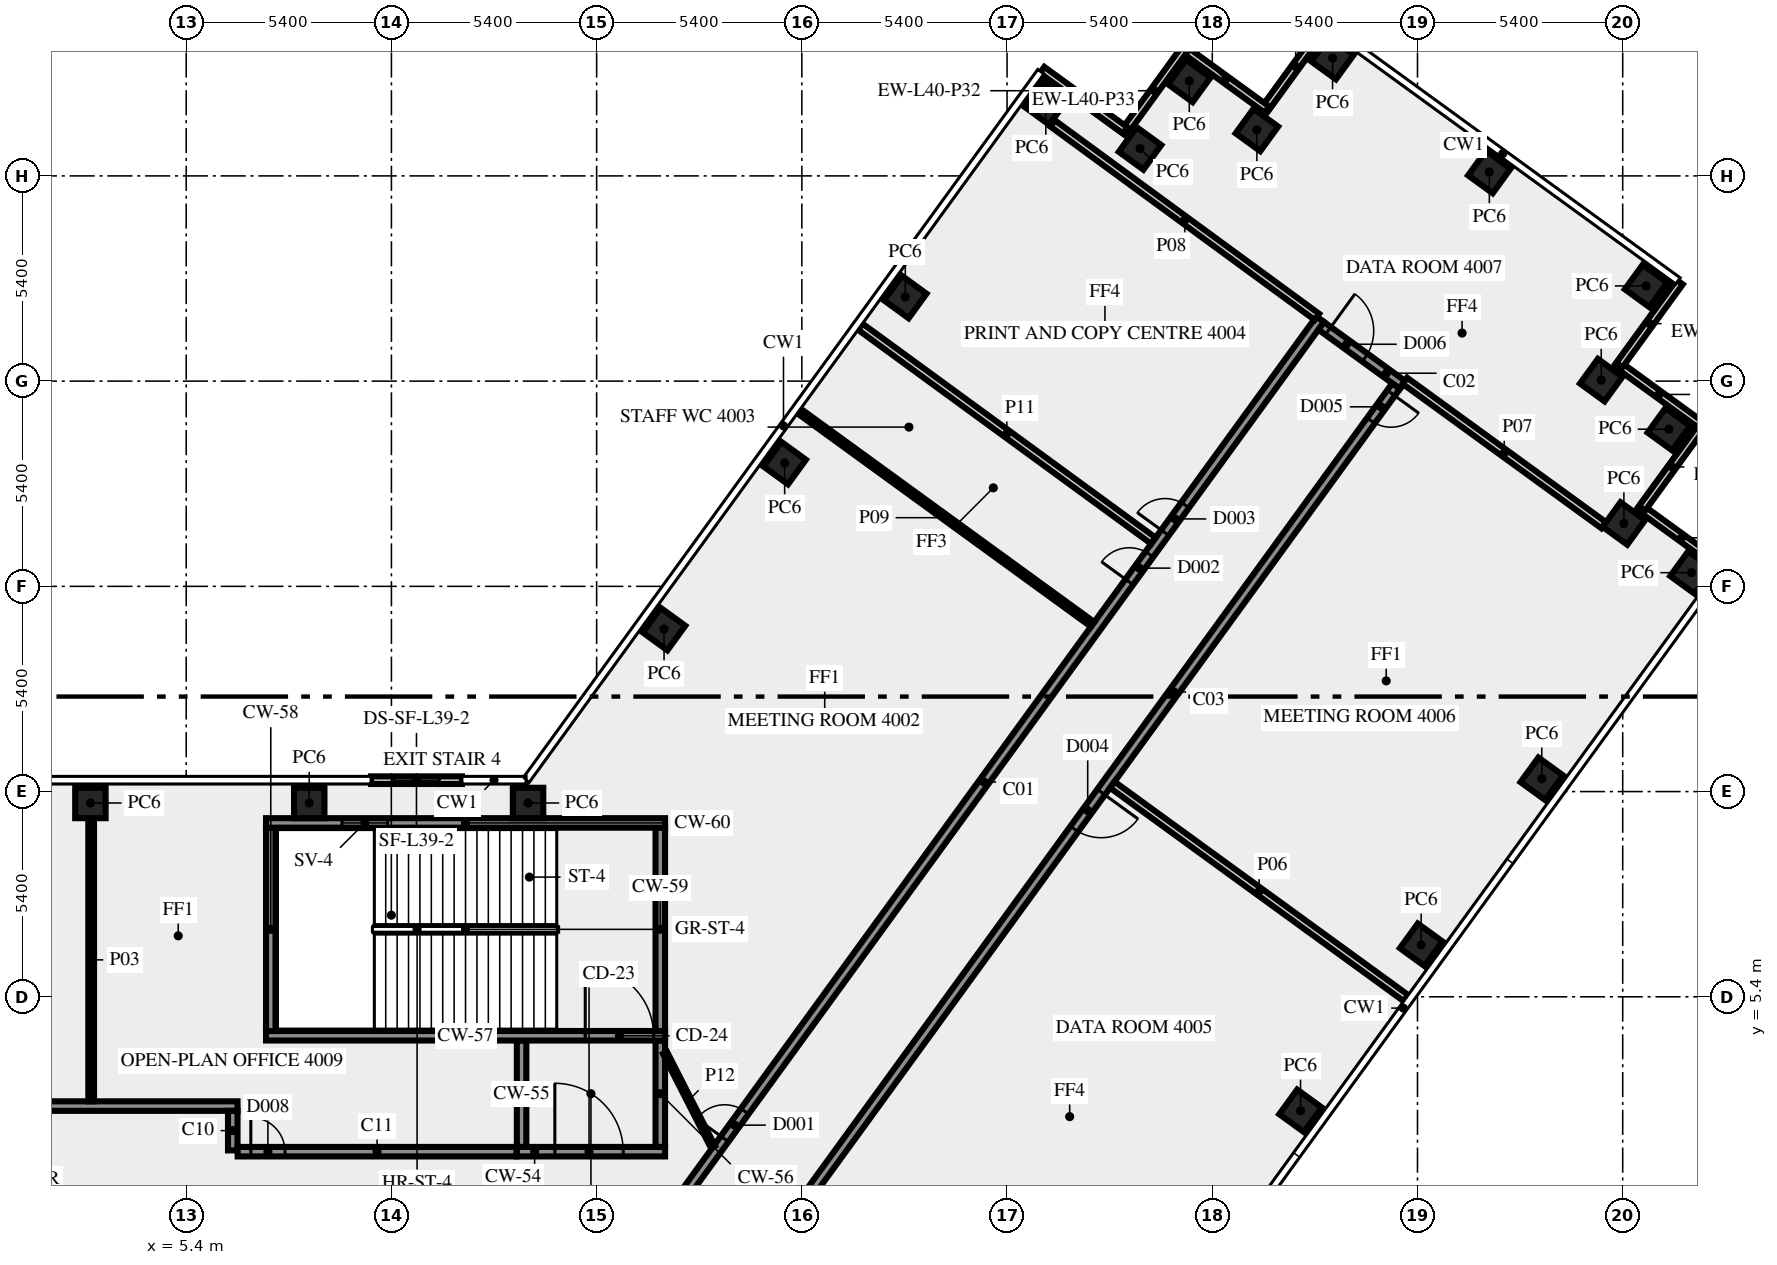
"""IFC4 building model, lengths in metres.
Left out: names, types, materials, properties, quantities, classifications, styles, units other than length and angle.
Written with IfcOpenShell. Run it as: python <this file> out.ifc"""

import sys

from ifc_helpers import new_model, si_unit, direction, frame, frame_2d, origin, origin_2d, place, context, subcontext, project, spatial, rectangle, extrude, element, fill, save


model = new_model("IFC4")
c1 = context("Model", 3, precision=1e-05, world=origin(), true_north=direction((0.0, 1.0)))
c2 = subcontext(c1, "Body", "Model", "MODEL_VIEW")
j1 = project(units=[si_unit("LENGTHUNIT", "METRE"), si_unit("PLANEANGLEUNIT", "RADIAN")], contexts=[c1])
p1 = place(None, origin())
s1 = spatial("IfcSite", under=j1, at=p1, CompositionType="ELEMENT")
p2 = place(p1, origin())
s2 = spatial("IfcBuilding", under=s1, at=p2, CompositionType="ELEMENT")
p3 = place(p2, frame((0.0, 0.0, 172.0)))
s3 = spatial("IfcBuildingStorey", under=s2, at=p3, CompositionType="ELEMENT", Elevation=172.0)
for number, where, z_axis, x_axis in (
    (1, (34.722, 2.4, 0.0), (0.0, 0.0, 1.0), (0.588, 0.809, 0.0)),
    (2, (37.896, 6.769, 0.0), (0.0, 0.0, 1.0), (0.588, 0.809, 0.0)),
    (3, (41.07, 11.137, 0.0), (0.0, 0.0, 1.0), (0.588, 0.809, 0.0)),
    (4, (45.01, 16.56, 0.0), (0.0, 0.0, 1.0), (0.588, 0.809, 0.0)),
    (5, (43.231, 17.854, 0.0), (0.0, 0.0, 1.0), (0.588, 0.809, 0.0)),
    (6, (44.415, 20.335, 0.0), (0.0, 0.0, 1.0), (0.588, 0.809, 0.0)),
    (7, (42.635, 21.626, 0.0), (0.0, 0.0, 1.0), (-0.809, 0.588, 0.0)),
    (8, (43.815, 24.105, 0.0), (0.0, 0.0, 1.0), (-0.809, 0.588, 0.0)),
    (9, (39.691, 27.102, 0.0), (0.0, 0.0, 1.0), (-0.809, 0.588, 0.0)),
    (10, (35.565, 30.1, 0.0), (0.0, 0.0, 1.0), (-0.588, -0.809, 0.0)),
    (11, (33.574, 28.209, 0.0), (0.0, 0.0, 1.0), (-0.809, 0.588, 0.0)),
    (12, (31.795, 29.5, 0.0), (0.0, 0.0, 1.0), (-0.588, -0.809, 0.0)),
    (13, (30.499, 27.723, 0.0), (0.0, 0.0, 1.0), (-0.809, 0.588, 0.0)),
    (14, (28.02, 28.905, 0.0), (0.0, 0.0, 1.0), (-0.809, 0.588, 0.0)),
    (15, (24.321, 23.812, 0.0), (0.0, 0.0, 1.0), (-0.588, -0.809, 0.0)),
    (16, (21.147, 19.444, 0.0), (0.0, 0.0, 1.0), (-0.588, -0.809, 0.0)),
    (17, (17.974, 15.075, 0.0), (0.0, 0.0, 1.0), (-0.588, -0.809, 0.0)),
    (18, (14.395, 10.5, 0.0), (0.0, 0.0, 1.0), (-1.0, 0.0, 0.0)),
    (19, (8.637, 10.5, 0.0), (0.0, 0.0, 1.0), (-1.0, 0.0, 0.0)),
    (20, (2.879, 10.5, 0.0), (0.0, 0.0, 1.0), (-1.0, 0.0, 0.0)),
):
    element("IfcColumn", number, at=place(p3, frame(where, z_axis=z_axis, x_axis=x_axis)), inside=s3, PredefinedType="COLUMN", context=c2, shape_type="SweptSolid", body=[
        extrude(rectangle(XDim=0.8, YDim=0.8, at=origin_2d()), origin(), (0.0, 0.0, 1.0), 3.65),
    ])
for number, where, z_axis, x_axis in (
    (21, (45.842, 16.685, 0.0), (0.0, 0.0, 1.0), (-0.809, 0.588, 0.0)),
    (22, (43.709, 18.249, 0.0), (0.0, 0.0, 1.0), (0.588, 0.809, 0.0)),
    (23, (45.245, 20.456, 0.0), (0.0, 0.0, 1.0), (-0.809, 0.588, 0.0)),
    (24, (43.113, 22.02, 0.0), (0.0, 0.0, 1.0), (0.588, 0.809, 0.0)),
    (25, (35.388, 30.97, 0.0), (0.0, 0.0, 1.0), (-0.588, -0.809, 0.0)),
    (26, (33.838, 28.744, 0.0), (0.0, 0.0, 1.0), (-0.809, 0.588, 0.0)),
    (27, (31.67, 30.333, 0.0), (0.0, 0.0, 1.0), (-0.588, -0.809, 0.0)),
    (28, (30.106, 28.2, 0.0), (0.0, 0.0, 1.0), (-0.809, 0.588, 0.0)),
):
    element("IfcWall", number, at=place(p3, frame(where, z_axis=z_axis, x_axis=x_axis)), inside=s3, PredefinedType="SOLIDWALL", context=c2, shape_type="SweptSolid", body=[
        extrude(rectangle(XDim=2.7, YDim=0.2, at=frame_2d((1.35, 0.0))), origin(), (0.0, 0.0, 1.0), 3.65),
    ])
p4 = place(p3, frame((12.655, 11.1, 0.0), z_axis=(0.0, 0.0, 1.0), x_axis=(-1.0, 0.0, 0.0)))
e29 = element("IfcWall", 29, at=p4, inside=s3, PredefinedType="SOLIDWALL", context=c2, shape_type="SweptSolid", body=[
    extrude(rectangle(XDim=2.392, YDim=0.2, at=frame_2d((1.196, 0.0))), origin(), (0.0, 0.0, 1.0), 3.65),
])
p5 = place(p4, frame((0.596, 0.0, 1.0)))
e30 = element("IfcOpeningElement", 30, at=p5, cuts=e29, PredefinedType="OPENING", context=c2, shape_type="SweptSolid", body=[
    extrude(rectangle(XDim=1.2, YDim=1.2, at=frame_2d((0.6, 0.6))), frame((0.0, 0.11, 0.0), z_axis=(0.0, -1.0, 0.0), x_axis=(1.0, 0.0, 0.0)), (0.0, 0.0, 1.0), 0.22),
])
p6 = place(p3, frame((14.1, 1.325, 0.0), z_axis=(0.0, 0.0, 1.0), x_axis=(1.0, 0.0, 0.0)))
e31 = element("IfcWall", 31, at=p6, inside=s3, PredefinedType="SHEAR", context=c2, shape_type="SweptSolid", body=[
    extrude(rectangle(XDim=3.9, YDim=0.25, at=frame_2d((1.95, 0.0))), origin(), (0.0, 0.0, 1.0), 3.65),
])
p7 = place(p6, frame((1.0, 0.0, 0.0)))
e32 = element("IfcOpeningElement", 32, at=p7, cuts=e31, PredefinedType="OPENING", context=c2, shape_type="SweptSolid", body=[
    extrude(rectangle(XDim=1.8, YDim=2.1, at=frame_2d((0.9, 1.05))), frame((0.0, 0.135, 0.0), z_axis=(0.0, -1.0, 0.0), x_axis=(1.0, 0.0, 0.0)), (0.0, 0.0, 1.0), 0.27),
])
for number, where, z_axis, x_axis in (
    (33, (14.225, 1.45, 0.0), (0.0, 0.0, 1.0), (0.0, 1.0, 0.0)),
    (34, (17.875, 1.45, 0.0), (0.0, 0.0, 1.0), (0.0, 1.0, 0.0)),
):
    element("IfcWall", number, at=place(p3, frame(where, z_axis=z_axis, x_axis=x_axis)), inside=s3, PredefinedType="SHEAR", context=c2, shape_type="SweptSolid", body=[
        extrude(rectangle(XDim=2.8, YDim=0.25, at=frame_2d((1.4, 0.0))), origin(), (0.0, 0.0, 1.0), 3.65),
    ])
p8 = place(p3, frame((7.5, 4.375, 0.0), z_axis=(0.0, 0.0, 1.0), x_axis=(1.0, 0.0, 0.0)))
e35 = element("IfcWall", 35, at=p8, inside=s3, PredefinedType="SHEAR", context=c2, shape_type="SweptSolid", body=[
    extrude(rectangle(XDim=10.5, YDim=0.25, at=frame_2d((5.25, 0.0))), origin(), (0.0, 0.0, 1.0), 3.65),
])
p9 = place(p8, frame((8.4, 0.0, 0.0)))
e36 = element("IfcOpeningElement", 36, at=p9, cuts=e35, PredefinedType="OPENING", context=c2, shape_type="SweptSolid", body=[
    extrude(rectangle(XDim=1.8, YDim=2.1, at=frame_2d((0.9, 1.05))), frame((0.0, 0.135, 0.0), z_axis=(0.0, -1.0, 0.0), x_axis=(1.0, 0.0, 0.0)), (0.0, 0.0, 1.0), 0.27),
])
for number, where, z_axis, x_axis in (
    (37, (7.625, 4.5, 0.0), (0.0, 0.0, 1.0), (0.0, 1.0, 0.0)),
    (38, (17.875, 4.5, 0.0), (0.0, 0.0, 1.0), (0.0, 1.0, 0.0)),
):
    element("IfcWall", number, at=place(p3, frame(where, z_axis=z_axis, x_axis=x_axis)), inside=s3, PredefinedType="SHEAR", context=c2, shape_type="SweptSolid", body=[
        extrude(rectangle(XDim=5.35, YDim=0.25, at=frame_2d((2.675, 0.0))), origin(), (0.0, 0.0, 1.0), 3.65),
    ])
p10 = place(p3, frame((7.5, 9.975, 0.0), z_axis=(0.0, 0.0, 1.0), x_axis=(1.0, 0.0, 0.0)))
e39 = element("IfcWall", 39, at=p10, inside=s3, PredefinedType="SHEAR", context=c2, shape_type="SweptSolid", body=[
    extrude(rectangle(XDim=10.5, YDim=0.25, at=frame_2d((5.25, 0.0))), origin(), (0.0, 0.0, 1.0), 3.65),
])
p11 = place(p10, frame((2.0, 0.0, 1.0)))
e40 = element("IfcOpeningElement", 40, at=p11, cuts=e39, PredefinedType="OPENING", context=c2, shape_type="SweptSolid", body=[
    extrude(rectangle(XDim=1.2, YDim=1.2, at=frame_2d((0.6, 0.6))), frame((0.0, 0.135, 0.0), z_axis=(0.0, -1.0, 0.0), x_axis=(1.0, 0.0, 0.0)), (0.0, 0.0, 1.0), 0.27),
])
p12 = place(p3, frame((17.545, -1.125, 0.0), z_axis=(0.0, 0.0, 1.0), x_axis=(0.587786330937, 0.809016210693, 0.0)))
e41 = element("IfcWall", 41, at=p12, inside=s3, PredefinedType="SOLIDWALL", context=c2, shape_type="SweptSolid", body=[
    extrude(rectangle(XDim=30.103, YDim=0.25, at=frame_2d((15.052, 0.0))), origin(), (0.0, 0.0, 1.0), 3.65),
])
p13 = place(p12, frame((3.441, 0.0, 0.0)))
e42 = element("IfcOpeningElement", 42, at=p13, cuts=e41, PredefinedType="OPENING", context=c2, shape_type="SweptSolid", body=[
    extrude(rectangle(XDim=0.9, YDim=2.1, at=frame_2d((0.45, 1.05))), frame((0.0, 0.135, 0.0), z_axis=(0.0, -1.0, 0.0), x_axis=(1.0, 0.0, 0.0)), (0.0, 0.0, 1.0), 0.27),
])
p14 = place(p12, frame((23.158, 0.0, 0.0)))
e43 = element("IfcOpeningElement", 43, at=p14, cuts=e41, PredefinedType="OPENING", context=c2, shape_type="SweptSolid", body=[
    extrude(rectangle(XDim=0.9, YDim=2.1, at=frame_2d((0.45, 1.05))), frame((0.0, 0.135, 0.0), z_axis=(0.0, -1.0, 0.0), x_axis=(1.0, 0.0, 0.0)), (0.0, 0.0, 1.0), 0.27),
])
p15 = place(p12, frame((21.558, 0.0, 0.0)))
e44 = element("IfcOpeningElement", 44, at=p15, cuts=e41, PredefinedType="OPENING", context=c2, shape_type="SweptSolid", body=[
    extrude(rectangle(XDim=0.9, YDim=2.1, at=frame_2d((0.45, 1.05))), frame((0.0, 0.135, 0.0), z_axis=(0.0, -1.0, 0.0), x_axis=(1.0, 0.0, 0.0)), (0.0, 0.0, 1.0), 0.27),
])
p16 = place(p3, frame((35.267, 23.054, 0.0), z_axis=(0.0, 0.0, 1.0), x_axis=(0.809038743598, -0.587755315891, 0.0)))
e45 = element("IfcWall", 45, at=p16, inside=s3, PredefinedType="SOLIDWALL", context=c2, shape_type="SweptSolid", body=[
    extrude(rectangle(XDim=2.65, YDim=0.25, at=frame_2d((1.325, 0.0))), origin(), (0.0, 0.0, 1.0), 3.65),
])
p17 = place(p16, frame((0.224, 0.0, 0.0)))
e46 = element("IfcOpeningElement", 46, at=p17, cuts=e45, PredefinedType="OPENING", context=c2, shape_type="SweptSolid", body=[
    extrude(rectangle(XDim=1.2, YDim=2.1, at=frame_2d((0.6, 1.05))), frame((0.0, 0.135, 0.0), z_axis=(0.0, -1.0, 0.0), x_axis=(1.0, 0.0, 0.0)), (0.0, 0.0, 1.0), 0.27),
])
p18 = place(p3, frame((37.236, 21.469, 0.0), z_axis=(0.0, 0.0, 1.0), x_axis=(-0.58778344073, -0.809018310549, 0.0)))
e47 = element("IfcWall", 47, at=p18, inside=s3, PredefinedType="SOLIDWALL", context=c2, shape_type="SweptSolid", body=[
    extrude(rectangle(XDim=28.42, YDim=0.25, at=frame_2d((14.21, 0.0))), origin(), (0.0, 0.0, 1.0), 3.65),
])
p19 = place(p18, frame((13.205, 0.0, 0.0)))
e48 = element("IfcOpeningElement", 48, at=p19, cuts=e47, PredefinedType="OPENING", context=c2, shape_type="SweptSolid", body=[
    extrude(rectangle(XDim=1.2, YDim=2.1, at=frame_2d((0.6, 1.05))), frame((0.0, 0.135, 0.0), z_axis=(0.0, -1.0, 0.0), x_axis=(1.0, 0.0, 0.0)), (0.0, 0.0, 1.0), 0.27),
])
p20 = place(p18, frame((0.224, 0.0, 0.0)))
e49 = element("IfcOpeningElement", 49, at=p20, cuts=e47, PredefinedType="OPENING", context=c2, shape_type="SweptSolid", body=[
    extrude(rectangle(XDim=0.9, YDim=2.1, at=frame_2d((0.45, 1.05))), frame((0.0, 0.135, 0.0), z_axis=(0.0, -1.0, 0.0), x_axis=(1.0, 0.0, 0.0)), (0.0, 0.0, 1.0), 0.27),
])
p21 = place(p3, frame((-4.5, 2.525, 0.0), z_axis=(0.0, 0.0, 1.0), x_axis=(1.0, 0.0, 0.0)))
e50 = element("IfcWall", 50, at=p21, inside=s3, PredefinedType="SOLIDWALL", context=c2, shape_type="SweptSolid", body=[
    extrude(rectangle(XDim=11.25, YDim=0.25, at=frame_2d((5.625, 0.0))), origin(), (0.0, 0.0, 1.0), 3.65),
])
p22 = place(p3, frame((6.625, 2.4, 0.0), z_axis=(0.0, 0.0, 1.0), x_axis=(0.0, -1.0, 0.0)))
e51 = element("IfcWall", 51, at=p22, inside=s3, PredefinedType="SOLIDWALL", context=c2, shape_type="SweptSolid", body=[
    extrude(rectangle(XDim=1.041, YDim=0.25, at=frame_2d((0.521, 0.0))), origin(), (0.0, 0.0, 1.0), 3.65),
])
p23 = place(p3, frame((6.754, 1.325, 0.0), z_axis=(0.0, 0.0, 1.0), x_axis=(1.0, 0.0, 0.0)))
e52 = element("IfcWall", 52, at=p23, inside=s3, PredefinedType="SOLIDWALL", context=c2, shape_type="SweptSolid", body=[
    extrude(rectangle(XDim=7.336, YDim=0.25, at=frame_2d((3.668, 0.0))), origin(), (0.0, 0.0, 1.0), 3.65),
])
p24 = place(p23, frame((0.346, 0.0, 0.0)))
e53 = element("IfcOpeningElement", 53, at=p24, cuts=e52, PredefinedType="OPENING", context=c2, shape_type="SweptSolid", body=[
    extrude(rectangle(XDim=0.9, YDim=2.1, at=frame_2d((0.45, 1.05))), frame((0.0, 0.135, 0.0), z_axis=(0.0, -1.0, 0.0), x_axis=(1.0, 0.0, 0.0)), (0.0, 0.0, 1.0), 0.27),
])
p25 = place(p3, frame((2.899, 10.095, 0.0), z_axis=(0.0, 0.0, 1.0), x_axis=(0.0, -1.0, 0.0)))
e54 = element("IfcWall", 54, at=p25, inside=s3, PredefinedType="PARTITIONING", context=c2, shape_type="SweptSolid", body=[
    extrude(rectangle(XDim=7.445, YDim=0.15, at=frame_2d((3.723, 0.0))), origin(), (0.0, 0.0, 1.0), 3.65),
])
p26 = place(p3, frame((37.496, 5.367, 0.0), z_axis=(0.0, 0.0, 1.0), x_axis=(-0.809048817734, 0.587741448702, 0.0)))
e55 = element("IfcWall", 55, at=p26, inside=s3, PredefinedType="SOLIDWALL", context=c2, shape_type="SweptSolid", body=[
    extrude(rectangle(XDim=9.55, YDim=0.2, at=frame_2d((4.775, 0.0))), origin(), (0.0, 0.0, 1.0), 2.85),
])
p27 = place(p3, frame((37.468, 21.61, 0.0), z_axis=(0.0, 0.0, 1.0), x_axis=(0.80901688725, -0.587785399737, 0.0)))
e56 = element("IfcWall", 56, at=p27, inside=s3, PredefinedType="SOLIDWALL", context=c2, shape_type="SweptSolid", body=[
    extrude(rectangle(XDim=6.465, YDim=0.2, at=frame_2d((3.232, 0.0))), origin(), (0.0, 0.0, 1.0), 3.65),
])
p28 = place(p3, frame((28.198, 28.381, 0.0), z_axis=(0.0, 0.0, 1.0), x_axis=(0.806977317905, -0.590582431492, 0.0)))
e57 = element("IfcWall", 57, at=p28, inside=s3, PredefinedType="SOLIDWALL", context=c2, shape_type="SweptSolid", body=[
    extrude(rectangle(XDim=8.62, YDim=0.2, at=frame_2d((4.31, 0.0))), origin(), (0.0, 0.0, 1.0), 3.65),
])
p29 = place(p3, frame((29.251, 15.2, 0.0), z_axis=(0.0, 0.0, 1.0), x_axis=(-0.808994684961, 0.587815957341, 0.0)))
e58 = element("IfcWall", 58, at=p29, inside=s3, PredefinedType="PARTITIONING", context=c2, shape_type="SweptSolid", body=[
    extrude(rectangle(XDim=9.55, YDim=0.15, at=frame_2d((4.775, 0.0))), origin(), (0.0, 0.0, 1.0), 2.85),
])
p30 = place(p3, frame((23.137, 23.032, 0.0), z_axis=(0.0, 0.0, 1.0), x_axis=(0.807661302092, -0.589646691759, 0.0)))
e59 = element("IfcWall", 59, at=p30, inside=s3, PredefinedType="SOLIDWALL", context=c2, shape_type="SweptSolid", body=[
    extrude(rectangle(XDim=9.55, YDim=0.2, at=frame_2d((4.775, 0.0))), origin(), (0.0, 0.0, 1.0), 2.85),
])
p31 = place(p3, frame((18.0, 3.925, 0.0), z_axis=(0.0, 0.0, 1.0), x_axis=(0.453950796792, -0.891026752736, 0.0)))
e60 = element("IfcWall", 60, at=p31, inside=s3, PredefinedType="PARTITIONING", context=c2, shape_type="SweptSolid", body=[
    extrude(rectangle(XDim=2.778, YDim=0.12, at=frame_2d((1.389, 0.0))), origin(), (0.0, 0.0, 1.0), 3.65),
])
p32 = place(p5, origin())
e61 = element("IfcWindow", 61, at=p32, inside=s3, PartitioningType="SINGLE_PANEL", PredefinedType="WINDOW", context=c2, shape_type="SweptSolid", body=[
    extrude(rectangle(XDim=1.2, YDim=1.2, at=frame_2d((0.6, 0.6))), frame((0.0, 0.03, 0.0), z_axis=(0.0, -1.0, 0.0), x_axis=(1.0, 0.0, 0.0)), (0.0, 0.0, 1.0), 0.06),
])
fill(e30, e61)
p33 = place(p7, origin())
e62 = element("IfcDoor", 62, at=p33, inside=s3, OperationType="DOUBLE_DOOR_SINGLE_SWING", PredefinedType="DOOR", context=c2, shape_type="SweptSolid", body=[
    extrude(rectangle(XDim=1.8, YDim=2.1, at=frame_2d((0.9, 1.05))), frame((0.0, 0.025, 0.0), z_axis=(0.0, -1.0, 0.0), x_axis=(1.0, 0.0, 0.0)), (0.0, 0.0, 1.0), 0.05),
])
fill(e32, e62)
p34 = place(p9, origin())
e63 = element("IfcDoor", 63, at=p34, inside=s3, OperationType="DOUBLE_DOOR_SINGLE_SWING", PredefinedType="DOOR", context=c2, shape_type="SweptSolid", body=[
    extrude(rectangle(XDim=1.8, YDim=2.1, at=frame_2d((0.9, 1.05))), frame((0.0, 0.025, 0.0), z_axis=(0.0, -1.0, 0.0), x_axis=(1.0, 0.0, 0.0)), (0.0, 0.0, 1.0), 0.05),
])
fill(e36, e63)
p35 = place(p11, origin())
e64 = element("IfcWindow", 64, at=p35, inside=s3, PartitioningType="SINGLE_PANEL", PredefinedType="WINDOW", context=c2, shape_type="SweptSolid", body=[
    extrude(rectangle(XDim=1.2, YDim=1.2, at=frame_2d((0.6, 0.6))), frame((0.0, 0.03, 0.0), z_axis=(0.0, -1.0, 0.0), x_axis=(1.0, 0.0, 0.0)), (0.0, 0.0, 1.0), 0.06),
])
fill(e40, e64)
p36 = place(p24, origin())
e65 = element("IfcDoor", 65, at=p36, inside=s3, OperationType="SINGLE_SWING_LEFT", PredefinedType="DOOR", context=c2, shape_type="SweptSolid", body=[
    extrude(rectangle(XDim=0.9, YDim=2.1, at=frame_2d((0.45, 1.05))), frame((0.0, 0.025, 0.0), z_axis=(0.0, -1.0, 0.0), x_axis=(1.0, 0.0, 0.0)), (0.0, 0.0, 1.0), 0.05),
])
fill(e53, e65)
p37 = place(p19, origin())
e66 = element("IfcDoor", 66, at=p37, inside=s3, OperationType="SINGLE_SWING_LEFT", PredefinedType="DOOR", context=c2, shape_type="SweptSolid", body=[
    extrude(rectangle(XDim=1.2, YDim=2.1, at=frame_2d((0.6, 1.05))), frame((0.0, 0.025, 0.0), z_axis=(0.0, -1.0, 0.0), x_axis=(1.0, 0.0, 0.0)), (0.0, 0.0, 1.0), 0.05),
])
fill(e48, e66)
p38 = place(p17, origin())
e67 = element("IfcDoor", 67, at=p38, inside=s3, OperationType="SINGLE_SWING_LEFT", PredefinedType="DOOR", context=c2, shape_type="SweptSolid", body=[
    extrude(rectangle(XDim=1.2, YDim=2.1, at=frame_2d((0.6, 1.05))), frame((0.0, 0.025, 0.0), z_axis=(0.0, -1.0, 0.0), x_axis=(1.0, 0.0, 0.0)), (0.0, 0.0, 1.0), 0.05),
])
fill(e46, e67)
p39 = place(p13, origin())
e68 = element("IfcDoor", 68, at=p39, inside=s3, OperationType="SINGLE_SWING_LEFT", PredefinedType="DOOR", context=c2, shape_type="SweptSolid", body=[
    extrude(rectangle(XDim=0.9, YDim=2.1, at=frame_2d((0.45, 1.05))), frame((0.0, 0.025, 0.0), z_axis=(0.0, -1.0, 0.0), x_axis=(1.0, 0.0, 0.0)), (0.0, 0.0, 1.0), 0.05),
])
fill(e42, e68)
p40 = place(p20, origin())
e69 = element("IfcDoor", 69, at=p40, inside=s3, OperationType="SINGLE_SWING_LEFT", PredefinedType="DOOR", context=c2, shape_type="SweptSolid", body=[
    extrude(rectangle(XDim=0.9, YDim=2.1, at=frame_2d((0.45, 1.05))), frame((0.0, 0.025, 0.0), z_axis=(0.0, -1.0, 0.0), x_axis=(1.0, 0.0, 0.0)), (0.0, 0.0, 1.0), 0.05),
])
fill(e49, e69)
p41 = place(p14, origin())
e70 = element("IfcDoor", 70, at=p41, inside=s3, OperationType="SINGLE_SWING_LEFT", PredefinedType="DOOR", context=c2, shape_type="SweptSolid", body=[
    extrude(rectangle(XDim=0.9, YDim=2.1, at=frame_2d((0.45, 1.05))), frame((0.0, 0.025, 0.0), z_axis=(0.0, -1.0, 0.0), x_axis=(1.0, 0.0, 0.0)), (0.0, 0.0, 1.0), 0.05),
])
fill(e43, e70)
p42 = place(p15, origin())
e71 = element("IfcDoor", 71, at=p42, inside=s3, OperationType="SINGLE_SWING_RIGHT", PredefinedType="DOOR", context=c2, shape_type="SweptSolid", body=[
    extrude(rectangle(XDim=0.9, YDim=2.1, at=frame_2d((0.45, 1.05))), frame((0.0, 0.025, 0.0), z_axis=(0.0, -1.0, 0.0), x_axis=(1.0, 0.0, 0.0)), (0.0, 0.0, 1.0), 0.05),
])
fill(e44, e71)
save(model, sys.argv[1])
